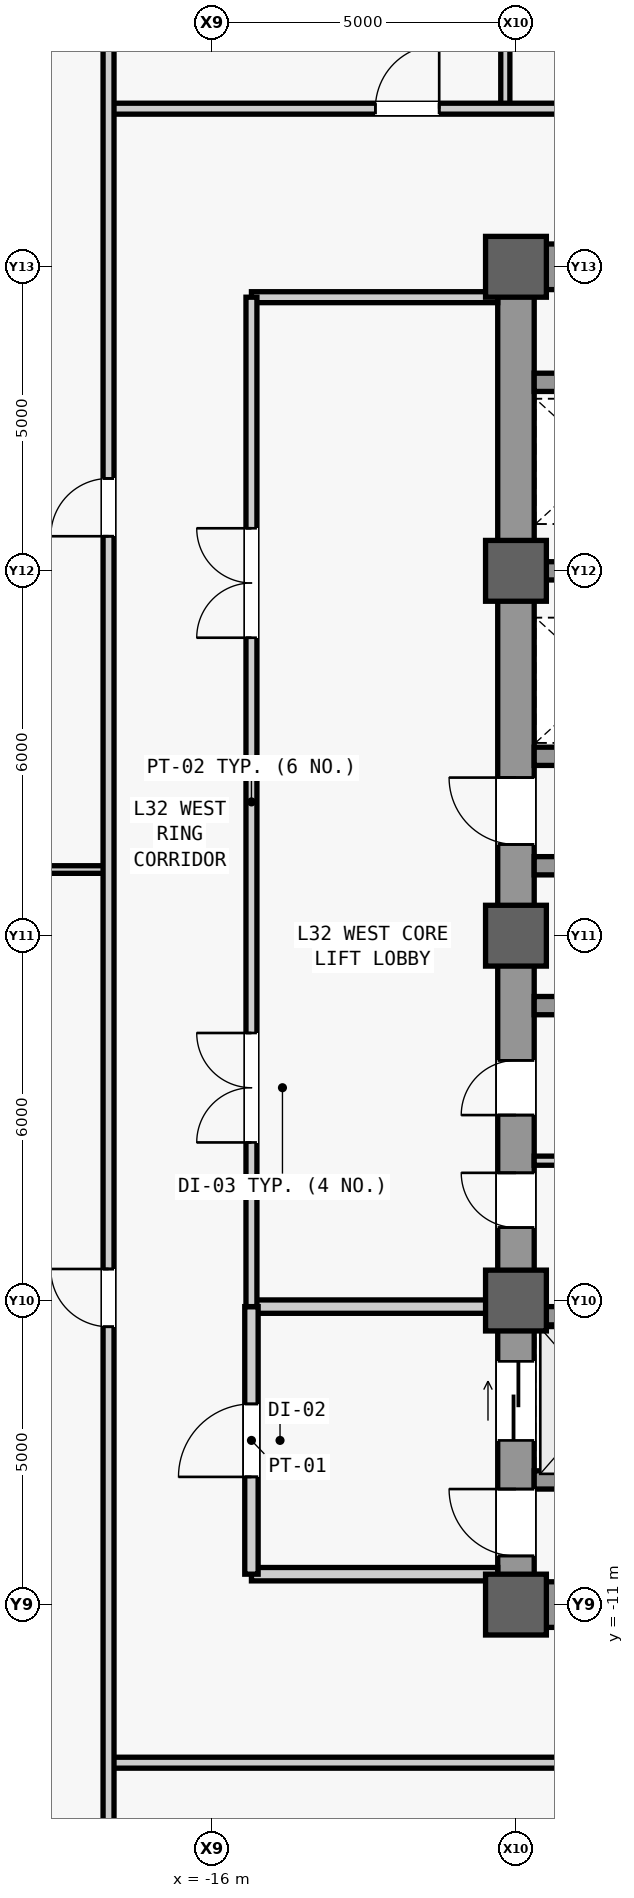
"""IFC4 building model, lengths in metres.
Left out: names, types, materials, properties, quantities, classifications, styles, units other than length and angle.
Written with IfcOpenShell. Run it as: python <this file> out.ifc"""

import sys

from ifc_helpers import new_model, si_unit, direction, frame, frame_2d, origin, origin_2d, place, context, subcontext, project, spatial, rectangle, extrude, source, transform, mapped, element, fill, save


model = new_model("IFC4")
c1 = context("Model", 3, precision=1e-05, world=origin(), true_north=direction((0.0, 1.0)))
c2 = subcontext(c1, "Body", "Model", "MODEL_VIEW")
j1 = project(units=[si_unit("LENGTHUNIT", "METRE"), si_unit("PLANEANGLEUNIT", "RADIAN")], contexts=[c1])
p1 = place(None, origin())
s1 = spatial("IfcSite", under=j1, at=p1, CompositionType="ELEMENT")
p2 = place(p1, origin())
s2 = spatial("IfcBuilding", under=s1, at=p2, CompositionType="ELEMENT")
p3 = place(p2, frame((0.0, 0.0, 140.6)))
s3 = spatial("IfcBuildingStorey", under=s2, at=p3, CompositionType="ELEMENT", Elevation=140.6)
m1 = source(origin(), c2, "Body", "SweptSolid", [
    extrude(rectangle(XDim=22.0, YDim=0.6, at=frame_2d((11.0, 0.0))), origin(), (0.0, 0.0, 1.0), 3.84),
])
p4 = place(p3, frame((-11.0, -11.0, 0.0), z_axis=(0.0, 0.0, 1.0), x_axis=(0.0, 1.0, 0.0)))
e1 = element("IfcWall", 1, at=p4, inside=s3, PredefinedType="SHEAR", context=c2, shape_type="MappedRepresentation", body=[
    mapped(m1, transform((0.0, 0.0, 0.0), scale=1.0)),
])
m2 = source(origin(), c2, "Body", "SweptSolid", [
    extrude(rectangle(XDim=1.1, YDim=2.2, at=frame_2d((0.55, 1.1))), frame((0.0, 0.31, 0.0), z_axis=(0.0, -1.0, 0.0), x_axis=(1.0, 0.0, 0.0)), (0.0, 0.0, 1.0), 0.62),
])
p5 = place(p4, frame((0.8, 0.0, 0.0)))
e2 = element("IfcOpeningElement", 2, at=p5, cuts=e1, PredefinedType="OPENING", context=c2, shape_type="MappedRepresentation", body=[
    mapped(m2, transform((0.0, 0.0, 0.0), scale=1.0)),
])
p6 = place(p4, frame((12.5, 0.0, 0.0)))
e3 = element("IfcOpeningElement", 3, at=p6, cuts=e1, PredefinedType="OPENING", context=c2, shape_type="MappedRepresentation", body=[
    mapped(m2, transform((0.0, 0.0, 0.0), scale=1.0)),
])
m3 = source(origin(), c2, "Body", "SweptSolid", [
    extrude(rectangle(XDim=0.9, YDim=2.15, at=frame_2d((0.45, 1.075))), frame((0.0, 0.31, 0.0), z_axis=(0.0, -1.0, 0.0), x_axis=(1.0, 0.0, 0.0)), (0.0, 0.0, 1.0), 0.62),
])
p7 = place(p4, frame((6.2, 0.0, 0.0)))
e4 = element("IfcOpeningElement", 4, at=p7, cuts=e1, PredefinedType="OPENING", context=c2, shape_type="MappedRepresentation", body=[
    mapped(m3, transform((0.0, 0.0, 0.0), scale=1.0)),
])
p8 = place(p4, frame((8.05, 0.0, 0.0)))
e5 = element("IfcOpeningElement", 5, at=p8, cuts=e1, PredefinedType="OPENING", context=c2, shape_type="MappedRepresentation", body=[
    mapped(m3, transform((0.0, 0.0, 0.0), scale=1.0)),
])
m4 = source(origin(), c2, "Body", "SweptSolid", [
    extrude(rectangle(XDim=1.3, YDim=2.3, at=frame_2d((0.65, 1.15))), frame((0.0, 0.31, 0.0), z_axis=(0.0, -1.0, 0.0), x_axis=(1.0, 0.0, 0.0)), (0.0, 0.0, 1.0), 0.62),
])
p9 = place(p4, frame((2.7, 0.0, 0.0)))
e6 = element("IfcOpeningElement", 6, at=p9, cuts=e1, PredefinedType="OPENING", context=c2, shape_type="MappedRepresentation", body=[
    mapped(m4, transform((0.0, 0.0, 0.0), scale=1.0)),
])
m5 = source(origin(), c2, "Body", "SweptSolid", [
    extrude(rectangle(XDim=5.85, YDim=0.75, at=frame_2d((2.925, 0.0))), origin(), (0.0, 0.0, 1.0), 3.84),
])
for number, where, z_axis, x_axis in (
    (7, (-10.7, -11.0, 0.0), (0.0, 0.0, 1.0), (1.0, 0.0, 0.0)),
    (8, (-10.7, 11.0, 0.0), (0.0, 0.0, 1.0), (1.0, 0.0, 0.0)),
):
    element("IfcWall", number, at=place(p3, frame(where, z_axis=z_axis, x_axis=x_axis)), inside=s3, PredefinedType="SHEAR", context=c2, shape_type="MappedRepresentation", body=[
        mapped(m5, transform((0.0, 0.0, 0.0), scale=1.0)),
    ])
m6 = source(origin(), c2, "Body", "SweptSolid", [
    extrude(rectangle(XDim=5.6, YDim=0.3, at=frame_2d((2.8, 0.0))), origin(), (0.0, 0.0, 1.0), 3.84),
])
for number, where, z_axis, x_axis in (
    (9, (-10.7, -1.15, 0.0), (0.0, 0.0, 1.0), (1.0, 0.0, 0.0)),
    (10, (-10.7, 1.15, 0.0), (0.0, 0.0, 1.0), (1.0, 0.0, 0.0)),
):
    element("IfcWall", number, at=place(p3, frame(where, z_axis=z_axis, x_axis=x_axis)), inside=s3, PredefinedType="SHEAR", context=c2, shape_type="MappedRepresentation", body=[
        mapped(m6, transform((0.0, 0.0, 0.0), scale=1.0)),
    ])
m7 = source(origin(), c2, "Body", "SweptSolid", [
    extrude(rectangle(XDim=1.0, YDim=1.0, at=origin_2d()), origin(), (0.0, 0.0, 1.0), 4.1),
])
for number, where, z_axis, x_axis in (
    (11, (-11.0, -11.0, 0.0), (0.0, 0.0, 1.0), (1.0, 0.0, 0.0)),
    (12, (-11.0, -6.0, 0.0), (0.0, 0.0, 1.0), (1.0, 0.0, 0.0)),
    (13, (-11.0, 0.0, 0.0), (0.0, 0.0, 1.0), (1.0, 0.0, 0.0)),
    (14, (-11.0, 6.0, 0.0), (0.0, 0.0, 1.0), (1.0, 0.0, 0.0)),
    (15, (-11.0, 11.0, 0.0), (0.0, 0.0, 1.0), (1.0, 0.0, 0.0)),
):
    element("IfcColumn", number, at=place(p3, frame(where, z_axis=z_axis, x_axis=x_axis)), inside=s3, PredefinedType="COLUMN", context=c2, shape_type="MappedRepresentation", body=[
        mapped(m7, transform((0.0, 0.0, 0.0), scale=1.0)),
    ])
m8 = source(origin(), c2, "Body", "SweptSolid", [
    extrude(rectangle(XDim=2.2, YDim=0.3, at=frame_2d((1.1, 0.0))), origin(), (0.0, 0.0, 1.0), 3.84),
])
for number, where, z_axis, x_axis in (
    (16, (-10.7, -8.95, 0.0), (0.0, 0.0, 1.0), (1.0, 0.0, 0.0)),
    (17, (-10.7, -6.25, 0.0), (0.0, 0.0, 1.0), (1.0, 0.0, 0.0)),
    (18, (-10.7, 2.95, 0.0), (0.0, 0.0, 1.0), (1.0, 0.0, 0.0)),
    (19, (-10.7, 6.0, 0.0), (0.0, 0.0, 1.0), (1.0, 0.0, 0.0)),
    (20, (-10.7, 9.1, 0.0), (0.0, 0.0, 1.0), (1.0, 0.0, 0.0)),
):
    element("IfcWall", number, at=place(p3, frame(where, z_axis=z_axis, x_axis=x_axis)), inside=s3, PredefinedType="SHEAR", context=c2, shape_type="MappedRepresentation", body=[
        mapped(m8, transform((0.0, 0.0, 0.0), scale=1.0)),
    ])
m9 = source(origin(), c2, "Body", "SweptSolid", [
    extrude(rectangle(XDim=2.05, YDim=0.15, at=frame_2d((1.025, 0.0))), origin(), (0.0, 0.0, 1.0), 3.84),
])
p10 = place(p3, frame((-10.7, -3.7, 0.0), z_axis=(0.0, 0.0, 1.0), x_axis=(1.0, 0.0, 0.0)))
e21 = element("IfcWall", 21, at=p10, inside=s3, PredefinedType="PARTITIONING", context=c2, shape_type="MappedRepresentation", body=[
    mapped(m9, transform((0.0, 0.0, 0.0), scale=1.0)),
])
m10 = source(origin(), c2, "Body", "SweptSolid", [
    extrude(rectangle(XDim=4.05, YDim=0.22, at=frame_2d((2.025, 0.0))), origin(), (0.0, 0.0, 1.0), 3.84),
])
p11 = place(p3, frame((-15.35, -10.5, 0.0), z_axis=(0.0, 0.0, 1.0), x_axis=(1.0, 0.0, 0.0)))
e22 = element("IfcWall", 22, at=p11, inside=s3, PredefinedType="PARTITIONING", context=c2, shape_type="MappedRepresentation", body=[
    mapped(m10, transform((0.0, 0.0, 0.0), scale=1.0)),
])
m11 = source(origin(), c2, "Body", "SweptSolid", [
    extrude(rectangle(XDim=4.05, YDim=0.22, at=frame_2d((2.025, 0.0))), origin(), (0.0, 0.0, 1.0), 3.067),
])
p12 = place(p3, frame((-15.35, -6.1, 0.0), z_axis=(0.0, 0.0, 1.0), x_axis=(1.0, 0.0, 0.0)))
e23 = element("IfcWall", 23, at=p12, inside=s3, PredefinedType="PARTITIONING", context=c2, shape_type="MappedRepresentation", body=[
    mapped(m11, transform((0.0, 0.0, 0.0), scale=1.0)),
])
m12 = source(origin(), c2, "Body", "SweptSolid", [
    extrude(rectangle(XDim=4.4, YDim=0.22, at=frame_2d((2.2, 0.0))), origin(), (0.0, 0.0, 1.0), 3.84),
])
p13 = place(p3, frame((-15.35, -10.5, 0.0), z_axis=(0.0, 0.0, 1.0), x_axis=(0.0, 1.0, 0.0)))
e24 = element("IfcWall", 24, at=p13, inside=s3, PredefinedType="PARTITIONING", context=c2, shape_type="MappedRepresentation", body=[
    mapped(m12, transform((0.0, 0.0, 0.0), scale=1.0)),
])
m13 = source(origin(), c2, "Body", "SweptSolid", [
    extrude(rectangle(XDim=1.2, YDim=2.2, at=frame_2d((0.6, 1.1))), frame((0.0, 0.12, 0.0), z_axis=(0.0, -1.0, 0.0), x_axis=(1.0, 0.0, 0.0)), (0.0, 0.0, 1.0), 0.24),
])
p14 = place(p13, frame((1.6, 0.0, 0.0)))
e25 = element("IfcOpeningElement", 25, at=p14, cuts=e24, PredefinedType="OPENING", context=c2, shape_type="MappedRepresentation", body=[
    mapped(m13, transform((0.0, 0.0, 0.0), scale=1.0)),
])
m14 = source(origin(), c2, "Body", "SweptSolid", [
    extrude(rectangle(XDim=4.05, YDim=0.18, at=frame_2d((2.025, 0.0))), origin(), (0.0, 0.0, 1.0), 3.84),
])
p15 = place(p3, frame((-15.35, 10.5, 0.0), z_axis=(0.0, 0.0, 1.0), x_axis=(1.0, 0.0, 0.0)))
e26 = element("IfcWall", 26, at=p15, inside=s3, PredefinedType="PARTITIONING", context=c2, shape_type="MappedRepresentation", body=[
    mapped(m14, transform((0.0, 0.0, 0.0), scale=1.0)),
])
m15 = source(origin(), c2, "Body", "SweptSolid", [
    extrude(rectangle(XDim=16.6, YDim=0.18, at=frame_2d((8.3, 0.0))), origin(), (0.0, 0.0, 1.0), 3.84),
])
p16 = place(p3, frame((-15.35, -6.1, 0.0), z_axis=(0.0, 0.0, 1.0), x_axis=(0.0, 1.0, 0.0)))
e27 = element("IfcWall", 27, at=p16, inside=s3, PredefinedType="PARTITIONING", context=c2, shape_type="MappedRepresentation", body=[
    mapped(m15, transform((0.0, 0.0, 0.0), scale=1.0)),
])
m16 = source(origin(), c2, "Body", "SweptSolid", [
    extrude(rectangle(XDim=1.8, YDim=2.25, at=frame_2d((0.9, 1.125))), frame((0.0, 0.1, 0.0), z_axis=(0.0, -1.0, 0.0), x_axis=(1.0, 0.0, 0.0)), (0.0, 0.0, 1.0), 0.2),
])
p17 = place(p16, frame((2.7, 0.0, 0.0)))
e28 = element("IfcOpeningElement", 28, at=p17, cuts=e27, PredefinedType="OPENING", context=c2, shape_type="MappedRepresentation", body=[
    mapped(m16, transform((0.0, 0.0, 0.0), scale=1.0)),
])
p18 = place(p16, frame((11.0, 0.0, 0.0)))
e29 = element("IfcOpeningElement", 29, at=p18, cuts=e27, PredefinedType="OPENING", context=c2, shape_type="MappedRepresentation", body=[
    mapped(m16, transform((0.0, 0.0, 0.0), scale=1.0)),
])
m17 = source(origin(), c2, "Body", "SweptSolid", [
    extrude(rectangle(XDim=36.25, YDim=0.18, at=frame_2d((18.125, 0.0))), origin(), (0.0, 0.0, 1.0), 3.84),
])
p19 = place(p3, frame((-17.7, -13.6, 0.0), z_axis=(0.0, 0.0, 1.0), x_axis=(1.0, 0.0, 0.0)))
e30 = element("IfcWall", 30, at=p19, inside=s3, PredefinedType="PARTITIONING", context=c2, shape_type="MappedRepresentation", body=[
    mapped(m17, transform((0.0, 0.0, 0.0), scale=1.0)),
])
m18 = source(origin(), c2, "Body", "SweptSolid", [
    extrude(rectangle(XDim=1.05, YDim=2.2, at=frame_2d((0.525, 1.1))), frame((0.0, 0.1, 0.0), z_axis=(0.0, -1.0, 0.0), x_axis=(1.0, 0.0, 0.0)), (0.0, 0.0, 1.0), 0.2),
])
p20 = place(p19, frame((9.1, 0.0, 0.0)))
e31 = element("IfcOpeningElement", 31, at=p20, cuts=e30, PredefinedType="OPENING", context=c2, shape_type="MappedRepresentation", body=[
    mapped(m18, transform((0.0, 0.0, 0.0), scale=1.0)),
])
p21 = place(p19, frame((23.5, 0.0, 0.0)))
e32 = element("IfcOpeningElement", 32, at=p21, cuts=e30, PredefinedType="OPENING", context=c2, shape_type="MappedRepresentation", body=[
    mapped(m18, transform((0.0, 0.0, 0.0), scale=1.0)),
])
m19 = source(origin(), c2, "Body", "SweptSolid", [
    extrude(rectangle(XDim=18.4, YDim=0.15, at=frame_2d((9.2, 0.0))), origin(), (0.0, 0.0, 1.0), 2.987),
])
p22 = place(p3, frame((-11.175, 13.6, 0.0), z_axis=(0.0, 0.0, 1.0), x_axis=(0.0, 1.0, 0.0)))
e33 = element("IfcWall", 33, at=p22, inside=s3, PredefinedType="PARTITIONING", context=c2, shape_type="MappedRepresentation", body=[
    mapped(m19, transform((0.0, 0.0, 0.0), scale=1.0)),
])
p23 = place(p3, frame((-17.7, 13.6, 0.0), z_axis=(0.0, 0.0, 1.0), x_axis=(1.0, 0.0, 0.0)))
e34 = element("IfcWall", 34, at=p23, inside=s3, PredefinedType="PARTITIONING", context=c2, shape_type="MappedRepresentation", body=[
    mapped(m17, transform((0.0, 0.0, 0.0), scale=1.0)),
])
p24 = place(p23, frame((4.387, 0.0, 0.0)))
e35 = element("IfcOpeningElement", 35, at=p24, cuts=e34, PredefinedType="OPENING", context=c2, shape_type="MappedRepresentation", body=[
    mapped(m18, transform((0.0, 0.0, 0.0), scale=1.0)),
])
p25 = place(p23, frame((9.625, 0.0, 0.0)))
e36 = element("IfcOpeningElement", 36, at=p25, cuts=e34, PredefinedType="OPENING", context=c2, shape_type="MappedRepresentation", body=[
    mapped(m18, transform((0.0, 0.0, 0.0), scale=1.0)),
])
p26 = place(p23, frame((17.6, 0.0, 0.0)))
e37 = element("IfcOpeningElement", 37, at=p26, cuts=e34, PredefinedType="OPENING", context=c2, shape_type="MappedRepresentation", body=[
    mapped(m18, transform((0.0, 0.0, 0.0), scale=1.0)),
])
p27 = place(p23, frame((25.938, 0.0, 0.0)))
e38 = element("IfcOpeningElement", 38, at=p27, cuts=e34, PredefinedType="OPENING", context=c2, shape_type="MappedRepresentation", body=[
    mapped(m18, transform((0.0, 0.0, 0.0), scale=1.0)),
])
p28 = place(p23, frame((30.75, 0.0, 0.0)))
e39 = element("IfcOpeningElement", 39, at=p28, cuts=e34, PredefinedType="OPENING", context=c2, shape_type="MappedRepresentation", body=[
    mapped(m18, transform((0.0, 0.0, 0.0), scale=1.0)),
])
m20 = source(origin(), c2, "Body", "SweptSolid", [
    extrude(rectangle(XDim=14.3, YDim=0.125, at=frame_2d((7.15, 0.0))), origin(), (0.0, 0.0, 1.0), 3.84),
])
p29 = place(p3, frame((-32.0, 1.088, 0.0), z_axis=(0.0, 0.0, 1.0), x_axis=(1.0, 0.0, 0.0)))
e40 = element("IfcWall", 40, at=p29, inside=s3, PredefinedType="PARTITIONING", context=c2, shape_type="MappedRepresentation", body=[
    mapped(m20, transform((0.0, 0.0, 0.0), scale=1.0)),
])
m21 = source(origin(), c2, "Body", "SweptSolid", [
    extrude(rectangle(XDim=56.0, YDim=0.18, at=frame_2d((28.0, 0.0))), origin(), (0.0, 0.0, 1.0), 3.84),
])
p30 = place(p3, frame((-17.7, -28.0, 0.0), z_axis=(0.0, 0.0, 1.0), x_axis=(0.0, 1.0, 0.0)))
e41 = element("IfcWall", 41, at=p30, inside=s3, PredefinedType="PARTITIONING", context=c2, shape_type="MappedRepresentation", body=[
    mapped(m21, transform((0.0, 0.0, 0.0), scale=1.0)),
])
m22 = source(origin(), c2, "Body", "SweptSolid", [
    extrude(rectangle(XDim=0.95, YDim=2.15, at=frame_2d((0.475, 1.075))), frame((0.0, 0.1, 0.0), z_axis=(0.0, -1.0, 0.0), x_axis=(1.0, 0.0, 0.0)), (0.0, 0.0, 1.0), 0.2),
])
p31 = place(p30, frame((21.569, 0.0, 0.0)))
e42 = element("IfcOpeningElement", 42, at=p31, cuts=e41, PredefinedType="OPENING", context=c2, shape_type="MappedRepresentation", body=[
    mapped(m22, transform((0.0, 0.0, 0.0), scale=1.0)),
])
p32 = place(p30, frame((34.569, 0.0, 0.0)))
e43 = element("IfcOpeningElement", 43, at=p32, cuts=e41, PredefinedType="OPENING", context=c2, shape_type="MappedRepresentation", body=[
    mapped(m22, transform((0.0, 0.0, 0.0), scale=1.0)),
])
m23 = source(origin(), c2, "Body", "SweptSolid", [
    extrude(rectangle(XDim=1.1, YDim=2.2, at=frame_2d((0.55, 1.1))), frame((0.0, 0.025, 0.0), z_axis=(0.0, -1.0, 0.0), x_axis=(1.0, 0.0, 0.0)), (0.0, 0.0, 1.0), 0.05),
])
p33 = place(p5, origin())
e44 = element("IfcDoor", 44, at=p33, inside=s3, OperationType="SINGLE_SWING_RIGHT", PredefinedType="DOOR", context=c2, shape_type="MappedRepresentation", body=[
    mapped(m23, transform((0.0, 0.0, 0.0), scale=1.0)),
])
fill(e2, e44)
p34 = place(p6, origin())
e45 = element("IfcDoor", 45, at=p34, inside=s3, OperationType="SINGLE_SWING_RIGHT", PredefinedType="DOOR", context=c2, shape_type="MappedRepresentation", body=[
    mapped(m23, transform((0.0, 0.0, 0.0), scale=1.0)),
])
fill(e3, e45)
m24 = source(origin(), c2, "Body", "SweptSolid", [
    extrude(rectangle(XDim=0.9, YDim=2.15, at=frame_2d((0.45, 1.075))), frame((0.0, 0.025, 0.0), z_axis=(0.0, -1.0, 0.0), x_axis=(1.0, 0.0, 0.0)), (0.0, 0.0, 1.0), 0.05),
])
p35 = place(p7, origin())
e46 = element("IfcDoor", 46, at=p35, inside=s3, OperationType="SINGLE_SWING_RIGHT", PredefinedType="DOOR", context=c2, shape_type="MappedRepresentation", body=[
    mapped(m24, transform((0.0, 0.0, 0.0), scale=1.0)),
])
fill(e4, e46)
p36 = place(p8, origin())
e47 = element("IfcDoor", 47, at=p36, inside=s3, OperationType="SINGLE_SWING_LEFT", PredefinedType="DOOR", context=c2, shape_type="MappedRepresentation", body=[
    mapped(m24, transform((0.0, 0.0, 0.0), scale=1.0)),
])
fill(e5, e47)
m25 = source(origin(), c2, "Body", "SweptSolid", [
    extrude(rectangle(XDim=1.2, YDim=2.2, at=frame_2d((0.6, 1.1))), frame((0.0, 0.025, 0.0), z_axis=(0.0, -1.0, 0.0), x_axis=(1.0, 0.0, 0.0)), (0.0, 0.0, 1.0), 0.05),
])
p37 = place(p14, origin())
e48 = element("IfcDoor", 48, at=p37, inside=s3, OperationType="SINGLE_SWING_LEFT", PredefinedType="DOOR", context=c2, shape_type="MappedRepresentation", body=[
    mapped(m25, transform((0.0, 0.0, 0.0), scale=1.0)),
])
fill(e25, e48)
m26 = source(origin(), c2, "Body", "SweptSolid", [
    extrude(rectangle(XDim=1.8, YDim=2.25, at=frame_2d((0.9, 1.125))), frame((0.0, 0.025, 0.0), z_axis=(0.0, -1.0, 0.0), x_axis=(1.0, 0.0, 0.0)), (0.0, 0.0, 1.0), 0.05),
])
p38 = place(p17, origin())
e49 = element("IfcDoor", 49, at=p38, inside=s3, OperationType="SINGLE_SWING_LEFT", PredefinedType="DOOR", context=c2, shape_type="MappedRepresentation", body=[
    mapped(m26, transform((0.0, 0.0, 0.0), scale=1.0)),
])
fill(e28, e49)
p39 = place(p18, origin())
e50 = element("IfcDoor", 50, at=p39, inside=s3, OperationType="SINGLE_SWING_RIGHT", PredefinedType="DOOR", context=c2, shape_type="MappedRepresentation", body=[
    mapped(m26, transform((0.0, 0.0, 0.0), scale=1.0)),
])
fill(e29, e50)
m27 = source(origin(), c2, "Body", "SweptSolid", [
    extrude(rectangle(XDim=1.05, YDim=2.2, at=frame_2d((0.525, 1.1))), frame((0.0, 0.025, 0.0), z_axis=(0.0, -1.0, 0.0), x_axis=(1.0, 0.0, 0.0)), (0.0, 0.0, 1.0), 0.05),
])
p40 = place(p24, origin())
e51 = element("IfcDoor", 51, at=p40, inside=s3, OperationType="SINGLE_SWING_RIGHT", PredefinedType="DOOR", context=c2, shape_type="MappedRepresentation", body=[
    mapped(m27, transform((0.0, 0.0, 0.0), scale=1.0)),
])
fill(e35, e51)
m28 = source(origin(), c2, "Body", "SweptSolid", [
    extrude(rectangle(XDim=0.95, YDim=2.15, at=frame_2d((0.475, 1.075))), frame((0.0, 0.025, 0.0), z_axis=(0.0, -1.0, 0.0), x_axis=(1.0, 0.0, 0.0)), (0.0, 0.0, 1.0), 0.05),
])
p41 = place(p31, origin())
e52 = element("IfcDoor", 52, at=p41, inside=s3, OperationType="SINGLE_SWING_RIGHT", PredefinedType="DOOR", context=c2, shape_type="MappedRepresentation", body=[
    mapped(m28, transform((0.0, 0.0, 0.0), scale=1.0)),
])
fill(e42, e52)
p42 = place(p32, origin())
e53 = element("IfcDoor", 53, at=p42, inside=s3, OperationType="SINGLE_SWING_LEFT", PredefinedType="DOOR", context=c2, shape_type="MappedRepresentation", body=[
    mapped(m28, transform((0.0, 0.0, 0.0), scale=1.0)),
])
fill(e43, e53)
m29 = source(origin(), c2, "Body", "SweptSolid", [
    extrude(rectangle(XDim=1.3, YDim=2.3, at=frame_2d((0.65, 1.15))), frame((0.0, 0.025, 0.0), z_axis=(0.0, -1.0, 0.0), x_axis=(1.0, 0.0, 0.0)), (0.0, 0.0, 1.0), 0.05),
])
p43 = place(p9, origin())
e54 = element("IfcDoor", 54, at=p43, inside=s3, OperationType="SLIDING_TO_LEFT", PredefinedType="DOOR", context=c2, shape_type="MappedRepresentation", body=[
    mapped(m29, transform((0.0, 0.0, 0.0), scale=1.0)),
])
fill(e6, e54)
save(model, sys.argv[1])
